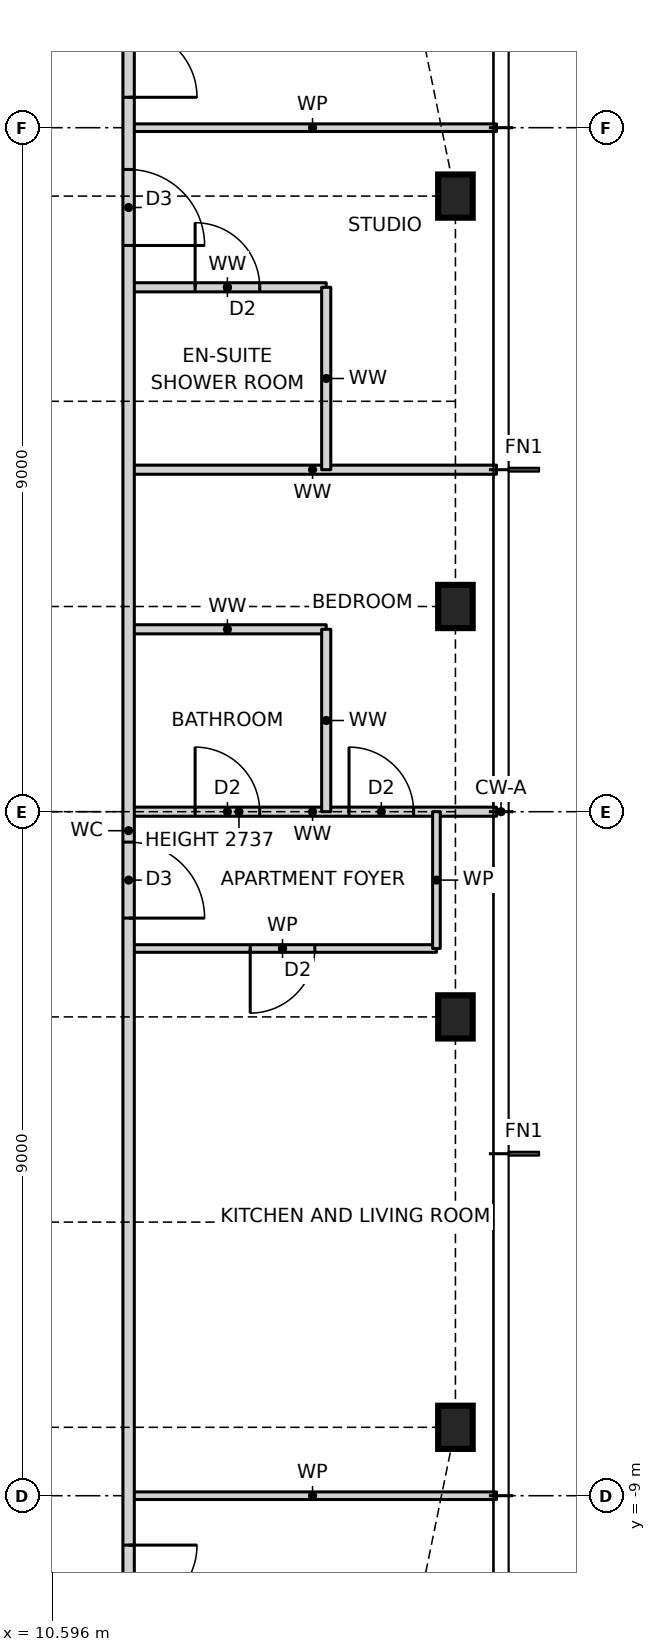
"""IFC4 building model, lengths in metres.
Left out: names, types, materials, properties, quantities, classifications, styles, units other than length and angle.
Written with IfcOpenShell. Run it as: python <this file> out.ifc"""

import sys

from ifc_helpers import new_model, si_unit, direction, frame, frame_2d, origin, origin_2d, place, context, subcontext, project, spatial, rectangle, i_section, extrude, element, fill, save


model = new_model("IFC4")
c1 = context("Model", 3, precision=1e-05, world=origin(), true_north=direction((0.0, 1.0)))
c2 = subcontext(c1, "Body", "Model", "MODEL_VIEW")
j1 = project(units=[si_unit("LENGTHUNIT", "METRE"), si_unit("PLANEANGLEUNIT", "RADIAN")], contexts=[c1])
p1 = place(None, origin())
s1 = spatial("IfcSite", under=j1, at=p1, CompositionType="ELEMENT")
p2 = place(p1, origin())
s2 = spatial("IfcBuilding", under=s1, at=p2, CompositionType="ELEMENT")
p3 = place(p2, frame((0.0, 0.0, 236.0)))
s3 = spatial("IfcBuildingStorey", under=s2, at=p3, CompositionType="ELEMENT", Elevation=236.0)
for number, where, z_axis, x_axis in (
    (1, (15.9, -8.1, 0.0), (0.0, 0.0, 1.0), (1.0, 0.0, 0.0)),
    (2, (15.9, -2.7, 0.0), (0.0, 0.0, 1.0), (1.0, 0.0, 0.0)),
    (3, (15.9, 2.7, 0.0), (0.0, 0.0, 1.0), (1.0, 0.0, 0.0)),
    (4, (15.9, 8.1, 0.0), (0.0, 0.0, 1.0), (1.0, 0.0, 0.0)),
):
    element("IfcColumn", number, at=place(p3, frame(where, z_axis=z_axis, x_axis=x_axis)), inside=s3, PredefinedType="COLUMN", context=c2, shape_type="SweptSolid", body=[
        extrude(i_section(OverallWidth=0.455, OverallDepth=0.569, WebThickness=0.078, FlangeThickness=0.125, at=origin_2d()), origin(), (0.0, 0.0, 1.0), 3.5),
    ])
p4 = place(p3, frame((11.6, -9.0, 0.0), z_axis=(0.0, 0.0, 1.0), x_axis=(1.0, 0.0, 0.0)))
e5 = element("IfcWall", 5, at=p4, inside=s3, PredefinedType="PARTITIONING", context=c2, shape_type="SweptSolid", body=[
    extrude(rectangle(XDim=4.84, YDim=0.1, at=frame_2d((2.42, 0.0))), origin(), (0.0, 0.0, 1.0), 3.27),
])
p5 = place(p3, frame((11.6, -1.8, 0.0), z_axis=(0.0, 0.0, 1.0), x_axis=(1.0, 0.0, 0.0)))
e6 = element("IfcWall", 6, at=p5, inside=s3, PredefinedType="PARTITIONING", context=c2, shape_type="SweptSolid", body=[
    extrude(rectangle(XDim=4.05, YDim=0.1, at=frame_2d((2.025, 0.0))), origin(), (0.0, 0.0, 1.0), 3.27),
])
p6 = place(p5, frame((1.6, 0.0, 0.0)))
e7 = element("IfcOpeningElement", 7, at=p6, cuts=e6, PredefinedType="OPENING", context=c2, shape_type="SweptSolid", body=[
    extrude(rectangle(XDim=0.85, YDim=2.1, at=frame_2d((0.425, 1.05))), frame((0.0, 0.06, 0.0), z_axis=(0.0, -1.0, 0.0), x_axis=(1.0, 0.0, 0.0)), (0.0, 0.0, 1.0), 0.12),
])
p7 = place(p3, frame((11.6, 0.0, 0.0), z_axis=(0.0, 0.0, 1.0), x_axis=(1.0, 0.0, 0.0)))
e8 = element("IfcWall", 8, at=p7, inside=s3, PredefinedType="PARTITIONING", context=c2, shape_type="SweptSolid", body=[
    extrude(rectangle(XDim=4.84, YDim=0.12, at=frame_2d((2.42, 0.0))), origin(), (0.0, 0.0, 1.0), 2.737),
])
p8 = place(p7, frame((2.9, 0.0, 0.0)))
e9 = element("IfcOpeningElement", 9, at=p8, cuts=e8, PredefinedType="OPENING", context=c2, shape_type="SweptSolid", body=[
    extrude(rectangle(XDim=0.85, YDim=2.1, at=frame_2d((0.425, 1.05))), frame((0.0, 0.07, 0.0), z_axis=(0.0, -1.0, 0.0), x_axis=(1.0, 0.0, 0.0)), (0.0, 0.0, 1.0), 0.14),
])
p9 = place(p7, frame((0.875, 0.0, 0.0)))
e10 = element("IfcOpeningElement", 10, at=p9, cuts=e8, PredefinedType="OPENING", context=c2, shape_type="SweptSolid", body=[
    extrude(rectangle(XDim=0.85, YDim=2.1, at=frame_2d((0.425, 1.05))), frame((0.0, 0.07, 0.0), z_axis=(0.0, -1.0, 0.0), x_axis=(1.0, 0.0, 0.0)), (0.0, 0.0, 1.0), 0.14),
])
p10 = place(p3, frame((11.6, 2.4, 0.0), z_axis=(0.0, 0.0, 1.0), x_axis=(1.0, 0.0, 0.0)))
e11 = element("IfcWall", 11, at=p10, inside=s3, PredefinedType="PARTITIONING", context=c2, shape_type="SweptSolid", body=[
    extrude(rectangle(XDim=2.6, YDim=0.12, at=frame_2d((1.3, 0.0))), origin(), (0.0, 0.0, 1.0), 3.27),
])
p11 = place(p3, frame((11.6, 4.5, 0.0), z_axis=(0.0, 0.0, 1.0), x_axis=(1.0, 0.0, 0.0)))
e12 = element("IfcWall", 12, at=p11, inside=s3, PredefinedType="PARTITIONING", context=c2, shape_type="SweptSolid", body=[
    extrude(rectangle(XDim=4.84, YDim=0.12, at=frame_2d((2.42, 0.0))), origin(), (0.0, 0.0, 1.0), 3.27),
])
p12 = place(p3, frame((11.6, 6.9, 0.0), z_axis=(0.0, 0.0, 1.0), x_axis=(1.0, 0.0, 0.0)))
e13 = element("IfcWall", 13, at=p12, inside=s3, PredefinedType="PARTITIONING", context=c2, shape_type="SweptSolid", body=[
    extrude(rectangle(XDim=2.6, YDim=0.12, at=frame_2d((1.3, 0.0))), origin(), (0.0, 0.0, 1.0), 3.27),
])
p13 = place(p12, frame((0.875, 0.0, 0.0)))
e14 = element("IfcOpeningElement", 14, at=p13, cuts=e13, PredefinedType="OPENING", context=c2, shape_type="SweptSolid", body=[
    extrude(rectangle(XDim=0.85, YDim=2.1, at=frame_2d((0.425, 1.05))), frame((0.0, 0.07, 0.0), z_axis=(0.0, -1.0, 0.0), x_axis=(1.0, 0.0, 0.0)), (0.0, 0.0, 1.0), 0.14),
])
p14 = place(p3, frame((11.6, 9.0, 0.0), z_axis=(0.0, 0.0, 1.0), x_axis=(1.0, 0.0, 0.0)))
e15 = element("IfcWall", 15, at=p14, inside=s3, PredefinedType="PARTITIONING", context=c2, shape_type="SweptSolid", body=[
    extrude(rectangle(XDim=4.84, YDim=0.1, at=frame_2d((2.42, 0.0))), origin(), (0.0, 0.0, 1.0), 3.27),
])
p15 = place(p3, frame((15.65, -1.8, 0.0), z_axis=(0.0, 0.0, 1.0), x_axis=(0.0, 1.0, 0.0)))
e16 = element("IfcWall", 16, at=p15, inside=s3, PredefinedType="PARTITIONING", context=c2, shape_type="SweptSolid", body=[
    extrude(rectangle(XDim=1.8, YDim=0.1, at=frame_2d((0.9, 0.0))), origin(), (0.0, 0.0, 1.0), 3.27),
])
for number, where, z_axis, x_axis in (
    (17, (14.2, 0.0, 0.0), (0.0, 0.0, 1.0), (0.0, 1.0, 0.0)),
    (18, (14.2, 4.5, 0.0), (0.0, 0.0, 1.0), (0.0, 1.0, 0.0)),
):
    element("IfcWall", number, at=place(p3, frame(where, z_axis=z_axis, x_axis=x_axis)), inside=s3, PredefinedType="PARTITIONING", context=c2, shape_type="SweptSolid", body=[
        extrude(rectangle(XDim=2.4, YDim=0.12, at=frame_2d((1.2, 0.0))), origin(), (0.0, 0.0, 1.0), 3.27),
    ])
p16 = place(p3, frame((11.6, -12.1, 0.0), z_axis=(0.0, 0.0, 1.0), x_axis=(0.0, 1.0, 0.0)))
e19 = element("IfcWall", 19, at=p16, inside=s3, PredefinedType="PARTITIONING", context=c2, shape_type="SweptSolid", body=[
    extrude(rectangle(XDim=23.7, YDim=0.15, at=frame_2d((11.85, 0.0))), origin(), (0.0, 0.0, 1.0), 3.27),
])
p17 = place(p16, frame((10.7, 0.0, 0.0)))
e20 = element("IfcOpeningElement", 20, at=p17, cuts=e19, PredefinedType="OPENING", context=c2, shape_type="SweptSolid", body=[
    extrude(rectangle(XDim=1.0, YDim=2.1, at=frame_2d((0.5, 1.05))), frame((0.0, 0.085, 0.0), z_axis=(0.0, -1.0, 0.0), x_axis=(1.0, 0.0, 0.0)), (0.0, 0.0, 1.0), 0.17),
])
p18 = place(p16, frame((19.55, 0.0, 0.0)))
e21 = element("IfcOpeningElement", 21, at=p18, cuts=e19, PredefinedType="OPENING", context=c2, shape_type="SweptSolid", body=[
    extrude(rectangle(XDim=1.0, YDim=2.1, at=frame_2d((0.5, 1.05))), frame((0.0, 0.085, 0.0), z_axis=(0.0, -1.0, 0.0), x_axis=(1.0, 0.0, 0.0)), (0.0, 0.0, 1.0), 0.17),
])
p19 = place(p16, frame((21.5, 0.0, 0.0)))
e22 = element("IfcOpeningElement", 22, at=p19, cuts=e19, PredefinedType="OPENING", context=c2, shape_type="SweptSolid", body=[
    extrude(rectangle(XDim=1.8, YDim=2.1, at=frame_2d((0.9, 1.05))), frame((0.0, 0.085, 0.0), z_axis=(0.0, -1.0, 0.0), x_axis=(1.0, 0.0, 0.0)), (0.0, 0.0, 1.0), 0.17),
])
p20 = place(p16, frame((0.65, 0.0, 0.0)))
e23 = element("IfcOpeningElement", 23, at=p20, cuts=e19, PredefinedType="OPENING", context=c2, shape_type="SweptSolid", body=[
    extrude(rectangle(XDim=1.8, YDim=2.1, at=frame_2d((0.9, 1.05))), frame((0.0, 0.085, 0.0), z_axis=(0.0, -1.0, 0.0), x_axis=(1.0, 0.0, 0.0)), (0.0, 0.0, 1.0), 0.17),
])
p21 = place(p17, frame((1.0, 0.0, 0.0), z_axis=(0.0, 0.0, 1.0), x_axis=(-1.0, 0.0, 0.0)))
e24 = element("IfcDoor", 24, at=p21, inside=s3, OperationType="SINGLE_SWING_RIGHT", PredefinedType="DOOR", context=c2, shape_type="SweptSolid", body=[
    extrude(rectangle(XDim=1.0, YDim=2.1, at=frame_2d((0.5, 1.05))), frame((0.0, 0.025, 0.0), z_axis=(0.0, -1.0, 0.0), x_axis=(1.0, 0.0, 0.0)), (0.0, 0.0, 1.0), 0.05),
])
fill(e20, e24)
p22 = place(p6, frame((0.85, 0.0, 0.0), z_axis=(0.0, 0.0, 1.0), x_axis=(-1.0, 0.0, 0.0)))
e25 = element("IfcDoor", 25, at=p22, inside=s3, OperationType="SINGLE_SWING_RIGHT", PredefinedType="DOOR", context=c2, shape_type="SweptSolid", body=[
    extrude(rectangle(XDim=0.85, YDim=2.1, at=frame_2d((0.425, 1.05))), frame((0.0, 0.025, 0.0), z_axis=(0.0, -1.0, 0.0), x_axis=(1.0, 0.0, 0.0)), (0.0, 0.0, 1.0), 0.05),
])
fill(e7, e25)
p23 = place(p8, origin())
e26 = element("IfcDoor", 26, at=p23, inside=s3, OperationType="SINGLE_SWING_LEFT", PredefinedType="DOOR", context=c2, shape_type="SweptSolid", body=[
    extrude(rectangle(XDim=0.85, YDim=2.1, at=frame_2d((0.425, 1.05))), frame((0.0, 0.025, 0.0), z_axis=(0.0, -1.0, 0.0), x_axis=(1.0, 0.0, 0.0)), (0.0, 0.0, 1.0), 0.05),
])
fill(e9, e26)
p24 = place(p9, origin())
e27 = element("IfcDoor", 27, at=p24, inside=s3, OperationType="SINGLE_SWING_LEFT", PredefinedType="DOOR", context=c2, shape_type="SweptSolid", body=[
    extrude(rectangle(XDim=0.85, YDim=2.1, at=frame_2d((0.425, 1.05))), frame((0.0, 0.025, 0.0), z_axis=(0.0, -1.0, 0.0), x_axis=(1.0, 0.0, 0.0)), (0.0, 0.0, 1.0), 0.05),
])
fill(e10, e27)
p25 = place(p18, frame((1.0, 0.0, 0.0), z_axis=(0.0, 0.0, 1.0), x_axis=(-1.0, 0.0, 0.0)))
e28 = element("IfcDoor", 28, at=p25, inside=s3, OperationType="SINGLE_SWING_RIGHT", PredefinedType="DOOR", context=c2, shape_type="SweptSolid", body=[
    extrude(rectangle(XDim=1.0, YDim=2.1, at=frame_2d((0.5, 1.05))), frame((0.0, 0.025, 0.0), z_axis=(0.0, -1.0, 0.0), x_axis=(1.0, 0.0, 0.0)), (0.0, 0.0, 1.0), 0.05),
])
fill(e21, e28)
p26 = place(p13, origin())
e29 = element("IfcDoor", 29, at=p26, inside=s3, OperationType="SINGLE_SWING_LEFT", PredefinedType="DOOR", context=c2, shape_type="SweptSolid", body=[
    extrude(rectangle(XDim=0.85, YDim=2.1, at=frame_2d((0.425, 1.05))), frame((0.0, 0.025, 0.0), z_axis=(0.0, -1.0, 0.0), x_axis=(1.0, 0.0, 0.0)), (0.0, 0.0, 1.0), 0.05),
])
fill(e14, e29)
p27 = place(p19, frame((1.8, 0.0, 0.0), z_axis=(0.0, 0.0, 1.0), x_axis=(-1.0, 0.0, 0.0)))
e30 = element("IfcDoor", 30, at=p27, inside=s3, OperationType="DOUBLE_DOOR_SINGLE_SWING", PredefinedType="DOOR", context=c2, shape_type="SweptSolid", body=[
    extrude(rectangle(XDim=1.8, YDim=2.1, at=frame_2d((0.9, 1.05))), frame((0.0, 0.025, 0.0), z_axis=(0.0, -1.0, 0.0), x_axis=(1.0, 0.0, 0.0)), (0.0, 0.0, 1.0), 0.05),
])
fill(e22, e30)
p28 = place(p20, frame((1.8, 0.0, 0.0), z_axis=(0.0, 0.0, 1.0), x_axis=(-1.0, 0.0, 0.0)))
e31 = element("IfcDoor", 31, at=p28, inside=s3, OperationType="DOUBLE_DOOR_SINGLE_SWING", PredefinedType="DOOR", context=c2, shape_type="SweptSolid", body=[
    extrude(rectangle(XDim=1.8, YDim=2.1, at=frame_2d((0.9, 1.05))), frame((0.0, 0.025, 0.0), z_axis=(0.0, -1.0, 0.0), x_axis=(1.0, 0.0, 0.0)), (0.0, 0.0, 1.0), 0.05),
])
fill(e23, e31)
save(model, sys.argv[1])
